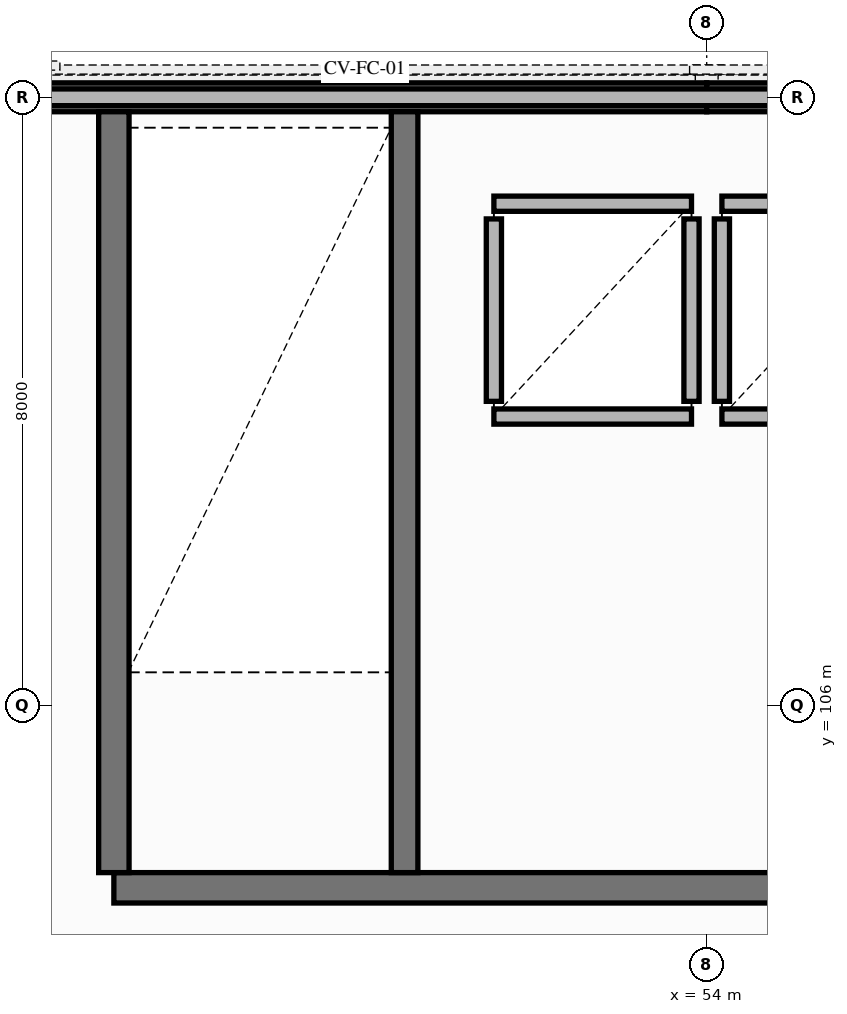
"""IFC4 building model, lengths in metres.
Left out: names, types, materials, properties, quantities, classifications, styles, units other than length and angle.
Written with IfcOpenShell. Run it as: python <this file> out.ifc"""

import sys

from ifc_helpers import new_model, si_unit, direction, frame, frame_2d, origin, place, context, subcontext, project, spatial, rectangle, extrude, element, fill, save


model = new_model("IFC4")
c1 = context("Model", 3, precision=1e-05, world=origin(), true_north=direction((0.0, 1.0)))
c2 = subcontext(c1, "Body", "Model", "MODEL_VIEW")
j1 = project(units=[si_unit("LENGTHUNIT", "METRE"), si_unit("PLANEANGLEUNIT", "RADIAN")], contexts=[c1])
p1 = place(None, origin())
s1 = spatial("IfcSite", under=j1, at=p1, CompositionType="ELEMENT")
p2 = place(p1, origin())
s2 = spatial("IfcBuilding", under=s1, at=p2, CompositionType="ELEMENT")
p3 = place(p2, frame((0.0, 0.0, 20.26)))
s3 = spatial("IfcBuildingStorey", under=s2, at=p3, CompositionType="ELEMENT", Elevation=20.26)
for number, where, z_axis, x_axis in (
    (1, (45.0, 114.0, 0.0), (0.0, 0.0, 1.0), (1.0, 0.0, 0.0)),
    (2, (54.0, 114.0, 0.0), (0.0, 0.0, 1.0), (1.0, 0.0, 0.0)),
):
    element("IfcWall", number, at=place(p3, frame(where, z_axis=z_axis, x_axis=x_axis)), inside=s3, PredefinedType="SOLIDWALL", context=c2, shape_type="SweptSolid", body=[
        extrude(rectangle(XDim=9.0, YDim=0.38, at=frame_2d((4.5, 0.0))), origin(), (0.0, 0.0, 1.0), 3.39),
    ])
p4 = place(p3, frame((80.78, 114.0, 3.64), z_axis=(0.0, 0.0, 1.0), x_axis=(-1.0, 0.0, 0.0)))
e3 = element("IfcWall", 3, at=p4, inside=s3, PredefinedType="PARAPET", context=c2, shape_type="SweptSolid", body=[
    extrude(rectangle(XDim=35.56, YDim=0.22, at=frame_2d((17.78, 0.0))), origin(), (0.0, 0.0, 1.0), 0.42),
])
p5 = place(p3, frame((46.2, 103.6, 0.0), z_axis=(0.0, 0.0, 1.0), x_axis=(1.0, 0.0, 0.0)))
e4 = element("IfcWall", 4, at=p5, inside=s3, PredefinedType="SHEAR", context=c2, shape_type="SweptSolid", body=[
    extrude(rectangle(XDim=13.2, YDim=0.4, at=frame_2d((6.6, 0.0))), origin(), (0.0, 0.0, 1.0), 3.39),
])
p6 = place(p5, frame((5.8, 0.0, 0.0)))
e5 = element("IfcOpeningElement", 5, at=p6, cuts=e4, PredefinedType="OPENING", context=c2, shape_type="SweptSolid", body=[
    extrude(rectangle(XDim=1.5, YDim=2.2, at=frame_2d((0.75, 1.1))), frame((0.0, 0.21, 0.0), z_axis=(0.0, -1.0, 0.0), x_axis=(1.0, 0.0, 0.0)), (0.0, 0.0, 1.0), 0.42),
])
p7 = place(p3, frame((46.2, 103.8, 0.0), z_axis=(0.0, 0.0, 1.0), x_axis=(0.0, 1.0, 0.0)))
e6 = element("IfcWall", 6, at=p7, inside=s3, PredefinedType="SHEAR", context=c2, shape_type="SweptSolid", body=[
    extrude(rectangle(XDim=10.01, YDim=0.4, at=frame_2d((5.005, 0.0))), origin(), (0.0, 0.0, 1.0), 3.39),
])
p8 = place(p3, frame((50.025, 103.8, 0.0), z_axis=(0.0, 0.0, 1.0), x_axis=(0.0, 1.0, 0.0)))
e7 = element("IfcWall", 7, at=p8, inside=s3, PredefinedType="SHEAR", context=c2, shape_type="SweptSolid", body=[
    extrude(rectangle(XDim=10.01, YDim=0.35, at=frame_2d((5.005, 0.0))), origin(), (0.0, 0.0, 1.0), 3.39),
])
p9 = place(p8, frame((0.45, 0.0, 0.0)))
e8 = element("IfcOpeningElement", 8, at=p9, cuts=e7, PredefinedType="OPENING", context=c2, shape_type="SweptSolid", body=[
    extrude(rectangle(XDim=1.05, YDim=2.2, at=frame_2d((0.525, 1.1))), frame((0.0, 0.185, 0.0), z_axis=(0.0, -1.0, 0.0), x_axis=(1.0, 0.0, 0.0)), (0.0, 0.0, 1.0), 0.37),
])
p10 = place(p3, frame((51.2, 109.8, 0.0), z_axis=(0.0, 0.0, 1.0), x_axis=(1.0, 0.0, 0.0)))
e9 = element("IfcWall", 9, at=p10, inside=s3, PredefinedType="PARTITIONING", context=c2, shape_type="SweptSolid", body=[
    extrude(rectangle(XDim=2.6, YDim=0.2, at=frame_2d((1.3, 0.0))), origin(), (0.0, 0.0, 1.0), 3.39),
])
p11 = place(p10, frame((0.75, 0.0, 0.0)))
e10 = element("IfcOpeningElement", 10, at=p11, cuts=e9, PredefinedType="OPENING", context=c2, shape_type="SweptSolid", body=[
    extrude(rectangle(XDim=1.1, YDim=2.15, at=frame_2d((0.55, 1.075))), frame((0.0, 0.11, 0.0), z_axis=(0.0, -1.0, 0.0), x_axis=(1.0, 0.0, 0.0)), (0.0, 0.0, 1.0), 0.22),
])
p12 = place(p3, frame((51.2, 112.6, 0.0), z_axis=(0.0, 0.0, 1.0), x_axis=(1.0, 0.0, 0.0)))
e11 = element("IfcWall", 11, at=p12, inside=s3, PredefinedType="PARTITIONING", context=c2, shape_type="SweptSolid", body=[
    extrude(rectangle(XDim=2.6, YDim=0.2, at=frame_2d((1.3, 0.0))), origin(), (0.0, 0.0, 1.0), 3.39),
])
for number, where, z_axis, x_axis in (
    (12, (51.2, 110.0, 0.0), (0.0, 0.0, 1.0), (0.0, 1.0, 0.0)),
    (13, (53.8, 110.0, 0.0), (0.0, 0.0, 1.0), (0.0, 1.0, 0.0)),
):
    element("IfcWall", number, at=place(p3, frame(where, z_axis=z_axis, x_axis=x_axis)), inside=s3, PredefinedType="PARTITIONING", context=c2, shape_type="SweptSolid", body=[
        extrude(rectangle(XDim=2.4, YDim=0.2, at=frame_2d((1.2, 0.0))), origin(), (0.0, 0.0, 1.0), 3.39),
    ])
p13 = place(p3, frame((54.2, 109.8, 0.0), z_axis=(0.0, 0.0, 1.0), x_axis=(1.0, 0.0, 0.0)))
e14 = element("IfcWall", 14, at=p13, inside=s3, PredefinedType="PARTITIONING", context=c2, shape_type="SweptSolid", body=[
    extrude(rectangle(XDim=2.6, YDim=0.2, at=frame_2d((1.3, 0.0))), origin(), (0.0, 0.0, 1.0), 3.39),
])
p14 = place(p13, frame((0.75, 0.0, 0.0)))
e15 = element("IfcOpeningElement", 15, at=p14, cuts=e14, PredefinedType="OPENING", context=c2, shape_type="SweptSolid", body=[
    extrude(rectangle(XDim=1.1, YDim=2.15, at=frame_2d((0.55, 1.075))), frame((0.0, 0.11, 0.0), z_axis=(0.0, -1.0, 0.0), x_axis=(1.0, 0.0, 0.0)), (0.0, 0.0, 1.0), 0.22),
])
p15 = place(p3, frame((54.2, 112.6, 0.0), z_axis=(0.0, 0.0, 1.0), x_axis=(1.0, 0.0, 0.0)))
e16 = element("IfcWall", 16, at=p15, inside=s3, PredefinedType="PARTITIONING", context=c2, shape_type="SweptSolid", body=[
    extrude(rectangle(XDim=2.6, YDim=0.2, at=frame_2d((1.3, 0.0))), origin(), (0.0, 0.0, 1.0), 3.39),
])
p16 = place(p3, frame((54.2, 110.0, 0.0), z_axis=(0.0, 0.0, 1.0), x_axis=(0.0, 1.0, 0.0)))
e17 = element("IfcWall", 17, at=p16, inside=s3, PredefinedType="PARTITIONING", context=c2, shape_type="SweptSolid", body=[
    extrude(rectangle(XDim=2.4, YDim=0.2, at=frame_2d((1.2, 0.0))), origin(), (0.0, 0.0, 1.0), 3.39),
])
p17 = place(p6, origin())
e18 = element("IfcDoor", 18, at=p17, inside=s3, OperationType="DOUBLE_DOOR_SINGLE_SWING", PredefinedType="DOOR", context=c2, shape_type="SweptSolid", body=[
    extrude(rectangle(XDim=1.5, YDim=2.2, at=frame_2d((0.75, 1.1))), frame((0.0, 0.025, 0.0), z_axis=(0.0, -1.0, 0.0), x_axis=(1.0, 0.0, 0.0)), (0.0, 0.0, 1.0), 0.05),
])
fill(e5, e18)
p18 = place(p9, origin())
e19 = element("IfcDoor", 19, at=p18, inside=s3, OperationType="SINGLE_SWING_RIGHT", PredefinedType="DOOR", context=c2, shape_type="SweptSolid", body=[
    extrude(rectangle(XDim=1.05, YDim=2.2, at=frame_2d((0.525, 1.1))), frame((0.0, 0.025, 0.0), z_axis=(0.0, -1.0, 0.0), x_axis=(1.0, 0.0, 0.0)), (0.0, 0.0, 1.0), 0.05),
])
fill(e8, e19)
p19 = place(p11, origin())
e20 = element("IfcDoor", 20, at=p19, inside=s3, OperationType="SLIDING_TO_LEFT", PredefinedType="DOOR", context=c2, shape_type="SweptSolid", body=[
    extrude(rectangle(XDim=1.1, YDim=2.15, at=frame_2d((0.55, 1.075))), frame((0.0, 0.025, 0.0), z_axis=(0.0, -1.0, 0.0), x_axis=(1.0, 0.0, 0.0)), (0.0, 0.0, 1.0), 0.05),
])
fill(e10, e20)
save(model, sys.argv[1])
